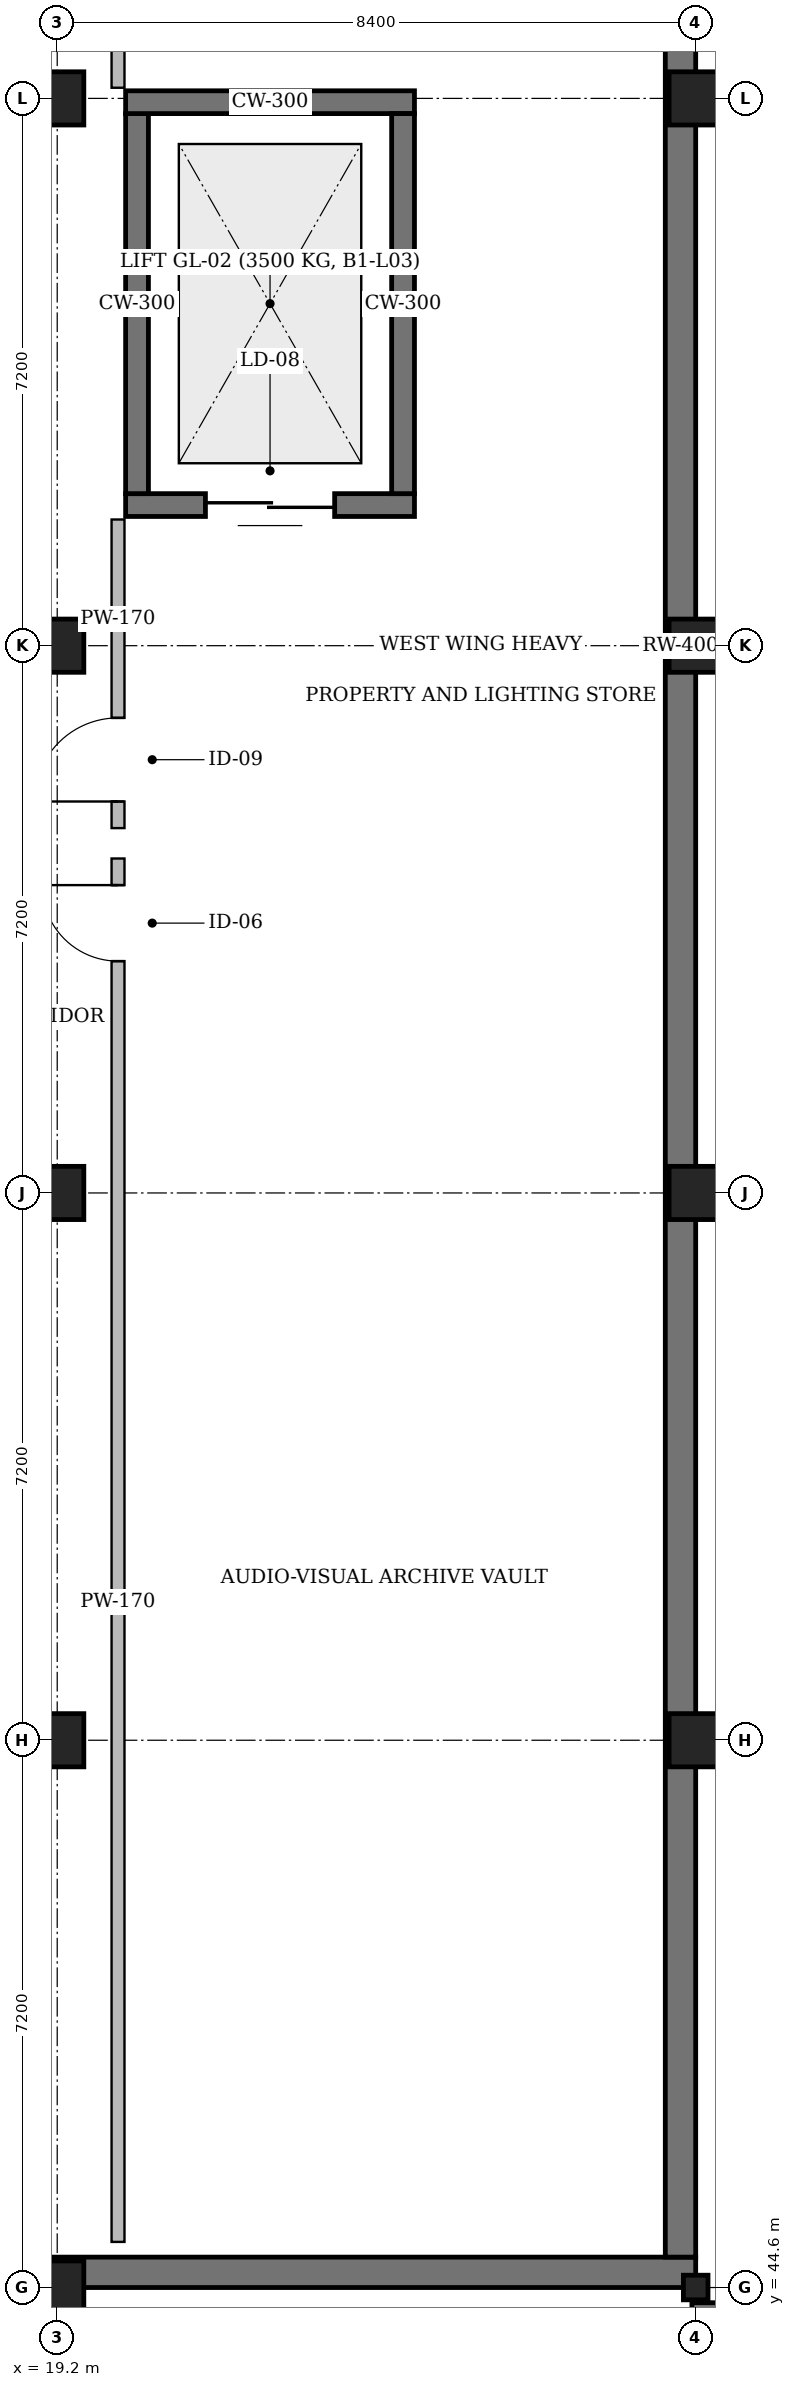
"""IFC4 building model, lengths in metres.
Left out: names, types, materials, properties, quantities, classifications, styles, units other than length and angle.
Written with IfcOpenShell. Run it as: python <this file> out.ifc"""

import sys

from ifc_helpers import new_model, si_unit, direction, frame, frame_2d, origin, origin_2d, place, context, subcontext, project, spatial, rectangle, hollow_circle, extrude, element, fill, save


model = new_model("IFC4")
c1 = context("Model", 3, precision=1e-05, world=origin(), true_north=direction((0.0, 1.0)))
c2 = subcontext(c1, "Body", "Model", "MODEL_VIEW")
j1 = project(units=[si_unit("LENGTHUNIT", "METRE"), si_unit("PLANEANGLEUNIT", "RADIAN")], contexts=[c1])
p1 = place(None, origin())
s1 = spatial("IfcSite", under=j1, at=p1, CompositionType="ELEMENT")
p2 = place(p1, origin())
s2 = spatial("IfcBuilding", under=s1, at=p2, CompositionType="ELEMENT")
p3 = place(p2, frame((0.0, 0.0, -4.8)))
s3 = spatial("IfcBuildingStorey", under=s2, at=p3, CompositionType="ELEMENT", Elevation=-4.8)
for number, where, z_axis, x_axis in (
    (1, (19.2, 44.6, 0.0), (0.0, 0.0, 1.0), (1.0, 0.0, 0.0)),
    (2, (19.2, 51.8, 0.0), (0.0, 0.0, 1.0), (1.0, 0.0, 0.0)),
    (3, (19.2, 59.0, 0.0), (0.0, 0.0, 1.0), (1.0, 0.0, 0.0)),
    (4, (19.2, 66.2, 0.0), (0.0, 0.0, 1.0), (1.0, 0.0, 0.0)),
    (5, (19.2, 73.4, 0.0), (0.0, 0.0, 1.0), (1.0, 0.0, 0.0)),
):
    element("IfcColumn", number, at=place(p3, frame(where, z_axis=z_axis, x_axis=x_axis)), inside=s3, PredefinedType="COLUMN", context=c2, shape_type="SweptSolid", body=[
        extrude(rectangle(XDim=0.7, YDim=0.7, at=origin_2d()), origin(), (0.0, 0.0, 1.0), 4.8),
    ])
p4 = place(p3, frame((27.6, 44.6, 0.0), z_axis=(0.0, 0.0, 1.0), x_axis=(1.0, 0.0, 0.0)))
e6 = element("IfcColumn", 6, at=p4, inside=s3, PredefinedType="COLUMN", context=c2, shape_type="SweptSolid", body=[
    extrude(hollow_circle(Radius=0.162, WallThickness=0.012, at=origin_2d()), origin(), (0.0, 0.0, 1.0), 4.8),
])
for number, where, z_axis, x_axis in (
    (7, (27.6, 51.8, 0.0), (0.0, 0.0, 1.0), (1.0, 0.0, 0.0)),
    (8, (27.6, 59.0, 0.0), (0.0, 0.0, 1.0), (1.0, 0.0, 0.0)),
    (9, (27.6, 66.2, 0.0), (0.0, 0.0, 1.0), (1.0, 0.0, 0.0)),
    (10, (27.6, 73.4, 0.0), (0.0, 0.0, 1.0), (1.0, 0.0, 0.0)),
):
    element("IfcColumn", number, at=place(p3, frame(where, z_axis=z_axis, x_axis=x_axis)), inside=s3, PredefinedType="COLUMN", context=c2, shape_type="SweptSolid", body=[
        extrude(rectangle(XDim=0.7, YDim=0.7, at=origin_2d()), origin(), (0.0, 0.0, 1.0), 4.8),
    ])
p5 = place(p3, frame((23.9, 68.05, 0.0), z_axis=(0.0, 0.0, 1.0), x_axis=(-1.0, 0.0, 0.0)))
e11 = element("IfcWall", 11, at=p5, inside=s3, PredefinedType="SOLIDWALL", context=c2, shape_type="SweptSolid", body=[
    extrude(rectangle(XDim=3.8, YDim=0.3, at=frame_2d((1.9, 0.0))), origin(), (0.0, 0.0, 1.0), 4.8),
])
p6 = place(p5, frame((1.05, 0.0, 0.0)))
e12 = element("IfcOpeningElement", 12, at=p6, cuts=e11, PredefinedType="OPENING", context=c2, shape_type="SweptSolid", body=[
    extrude(rectangle(XDim=1.7, YDim=2.4, at=frame_2d((0.85, 1.2))), frame((0.0, 0.17, 0.0), z_axis=(0.0, -1.0, 0.0), x_axis=(1.0, 0.0, 0.0)), (0.0, 0.0, 1.0), 0.34),
])
p7 = place(p3, frame((20.25, 68.2, 0.0), z_axis=(0.0, 0.0, 1.0), x_axis=(0.0, 1.0, 0.0)))
e13 = element("IfcWall", 13, at=p7, inside=s3, PredefinedType="SOLIDWALL", context=c2, shape_type="SweptSolid", body=[
    extrude(rectangle(XDim=5.0, YDim=0.3, at=frame_2d((2.5, 0.0))), origin(), (0.0, 0.0, 1.0), 4.8),
])
p8 = place(p3, frame((20.1, 73.35, 0.0), z_axis=(0.0, 0.0, 1.0), x_axis=(1.0, 0.0, 0.0)))
e14 = element("IfcWall", 14, at=p8, inside=s3, PredefinedType="SOLIDWALL", context=c2, shape_type="SweptSolid", body=[
    extrude(rectangle(XDim=3.8, YDim=0.3, at=frame_2d((1.9, 0.0))), origin(), (0.0, 0.0, 1.0), 4.8),
])
p9 = place(p3, frame((23.75, 73.2, 0.0), z_axis=(0.0, 0.0, 1.0), x_axis=(0.0, -1.0, 0.0)))
e15 = element("IfcWall", 15, at=p9, inside=s3, PredefinedType="SOLIDWALL", context=c2, shape_type="SweptSolid", body=[
    extrude(rectangle(XDim=5.0, YDim=0.3, at=frame_2d((2.5, 0.0))), origin(), (0.0, 0.0, 1.0), 4.8),
])
p10 = place(p3, frame((27.75, 1.58, 0.0), z_axis=(0.0, 0.0, 1.0), x_axis=(0.0, 1.0, 0.0)))
e16 = element("IfcWall", 16, at=p10, inside=s3, PredefinedType="SOLIDWALL", context=c2, shape_type="SweptSolid", body=[
    extrude(rectangle(XDim=42.82, YDim=0.4, at=frame_2d((21.41, 0.0))), origin(), (0.0, 0.0, 1.0), 4.63),
])
p11 = place(p3, frame((5.86, 44.8, 0.0), z_axis=(0.0, 0.0, 1.0), x_axis=(1.0, 0.0, 0.0)))
e17 = element("IfcWall", 17, at=p11, inside=s3, PredefinedType="SOLIDWALL", context=c2, shape_type="SweptSolid", body=[
    extrude(rectangle(XDim=21.74, YDim=0.4, at=frame_2d((10.87, 0.0))), origin(), (0.0, 0.0, 1.0), 4.48),
])
p12 = place(p3, frame((27.4, 45.0, 0.0), z_axis=(0.0, 0.0, 1.0), x_axis=(0.0, 1.0, 0.0)))
e18 = element("IfcWall", 18, at=p12, inside=s3, PredefinedType="SOLIDWALL", context=c2, shape_type="SweptSolid", body=[
    extrude(rectangle(XDim=42.4, YDim=0.4, at=frame_2d((21.2, 0.0))), origin(), (0.0, 0.0, 1.0), 4.48),
])
p13 = place(p3, frame((20.0, 45.2, 0.0), z_axis=(0.0, 0.0, 1.0), x_axis=(0.0, 1.0, 0.0)))
e19 = element("IfcWall", 19, at=p13, inside=s3, PredefinedType="PARTITIONING", context=c2, shape_type="SweptSolid", body=[
    extrude(rectangle(XDim=18.2, YDim=0.17, at=frame_2d((9.1, 0.0))), origin(), (0.0, 0.0, 1.0), 4.54),
])
p14 = place(p13, frame((16.85, 0.0, 0.0)))
e20 = element("IfcOpeningElement", 20, at=p14, cuts=e19, PredefinedType="OPENING", context=c2, shape_type="SweptSolid", body=[
    extrude(rectangle(XDim=1.0, YDim=2.2, at=frame_2d((0.5, 1.1))), frame((0.0, 0.105, 0.0), z_axis=(0.0, -1.0, 0.0), x_axis=(1.0, 0.0, 0.0)), (0.0, 0.0, 1.0), 0.21),
])
p15 = place(p3, frame((20.0, 63.8, 0.0), z_axis=(0.0, 0.0, 1.0), x_axis=(0.0, 1.0, 0.0)))
e21 = element("IfcWall", 21, at=p15, inside=s3, PredefinedType="PARTITIONING", context=c2, shape_type="SweptSolid", body=[
    extrude(rectangle(XDim=4.06, YDim=0.17, at=frame_2d((2.03, 0.0))), origin(), (0.0, 0.0, 1.0), 4.54),
])
p16 = place(p15, frame((0.35, 0.0, 0.0)))
e22 = element("IfcOpeningElement", 22, at=p16, cuts=e21, PredefinedType="OPENING", context=c2, shape_type="SweptSolid", body=[
    extrude(rectangle(XDim=1.1, YDim=2.1, at=frame_2d((0.55, 1.05))), frame((0.0, 0.105, 0.0), z_axis=(0.0, -1.0, 0.0), x_axis=(1.0, 0.0, 0.0)), (0.0, 0.0, 1.0), 0.21),
])
p17 = place(p3, frame((20.0, 73.54, 0.0), z_axis=(0.0, 0.0, 1.0), x_axis=(0.0, 1.0, 0.0)))
e23 = element("IfcWall", 23, at=p17, inside=s3, PredefinedType="PARTITIONING", context=c2, shape_type="SweptSolid", body=[
    extrude(rectangle(XDim=6.46, YDim=0.17, at=frame_2d((3.23, 0.0))), origin(), (0.0, 0.0, 1.0), 4.54),
])
p18 = place(p6, origin())
e24 = element("IfcDoor", 24, at=p18, inside=s3, OperationType="DOUBLE_DOOR_SLIDING", PredefinedType="DOOR", context=c2, shape_type="SweptSolid", body=[
    extrude(rectangle(XDim=1.7, YDim=2.4, at=frame_2d((0.85, 1.2))), frame((0.0, 0.025, 0.0), z_axis=(0.0, -1.0, 0.0), x_axis=(1.0, 0.0, 0.0)), (0.0, 0.0, 1.0), 0.05),
])
fill(e12, e24)
p19 = place(p14, origin())
e25 = element("IfcDoor", 25, at=p19, inside=s3, OperationType="SINGLE_SWING_RIGHT", PredefinedType="DOOR", context=c2, shape_type="SweptSolid", body=[
    extrude(rectangle(XDim=1.0, YDim=2.2, at=frame_2d((0.5, 1.1))), frame((0.0, 0.025, 0.0), z_axis=(0.0, -1.0, 0.0), x_axis=(1.0, 0.0, 0.0)), (0.0, 0.0, 1.0), 0.05),
])
fill(e20, e25)
p20 = place(p16, origin())
e26 = element("IfcDoor", 26, at=p20, inside=s3, OperationType="SINGLE_SWING_LEFT", PredefinedType="DOOR", context=c2, shape_type="SweptSolid", body=[
    extrude(rectangle(XDim=1.1, YDim=2.1, at=frame_2d((0.55, 1.05))), frame((0.0, 0.025, 0.0), z_axis=(0.0, -1.0, 0.0), x_axis=(1.0, 0.0, 0.0)), (0.0, 0.0, 1.0), 0.05),
])
fill(e22, e26)
save(model, sys.argv[1])
